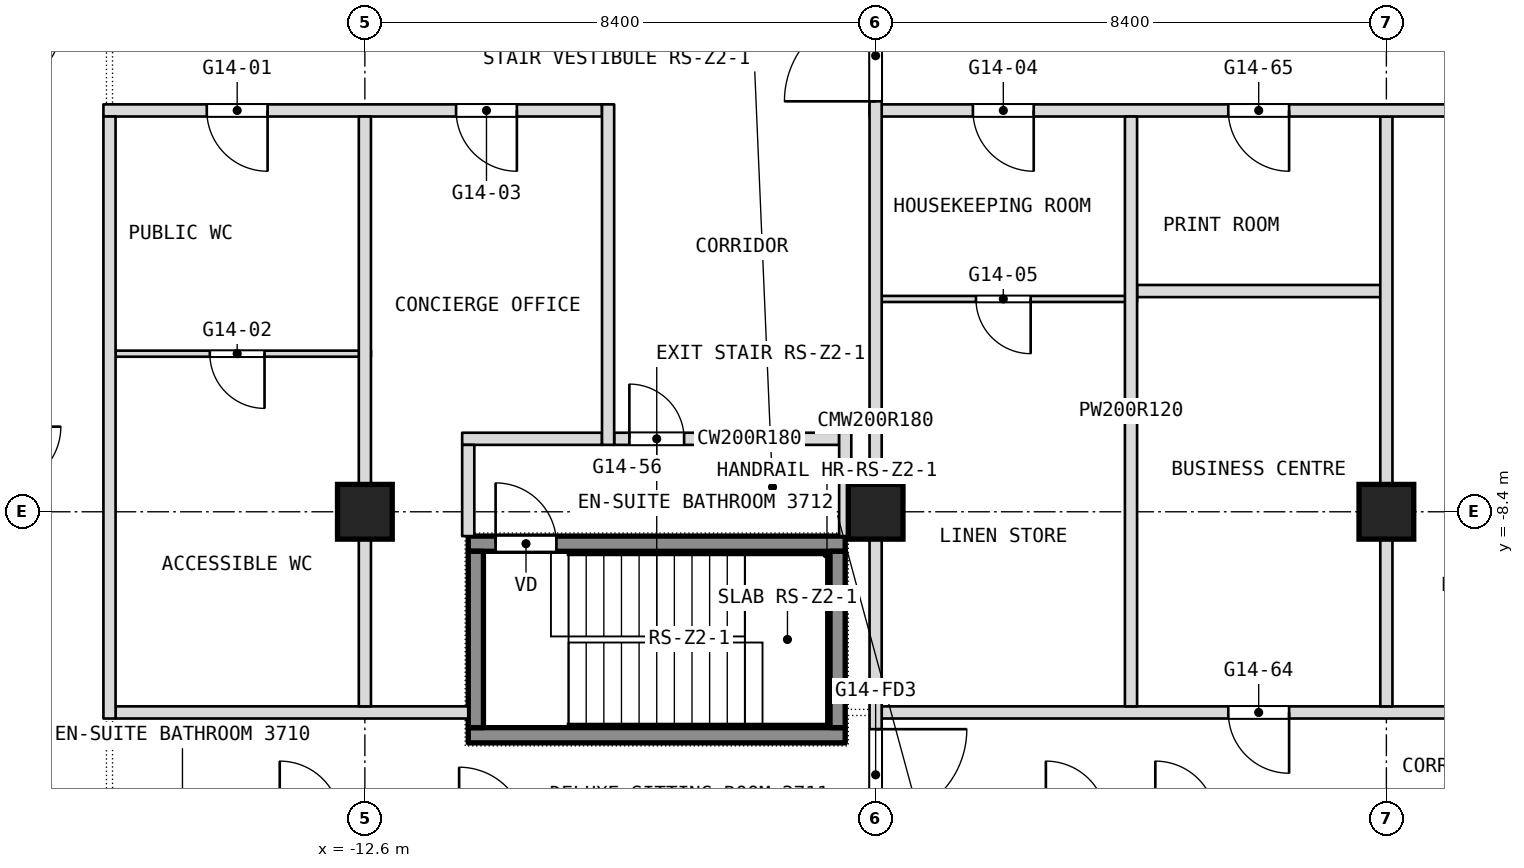
"""IFC4 building model, lengths in metres.
Left out: names, types, materials, properties, quantities, classifications, styles, units other than length and angle.
Written with IfcOpenShell. Run it as: python <this file> out.ifc"""

import sys

from ifc_helpers import new_model, si_unit, direction, frame, frame_2d, origin, origin_2d, place, context, subcontext, project, spatial, rectangle, extrude, element, fill, save


model = new_model("IFC4")
c1 = context("Model", 3, precision=1e-05, world=origin(), true_north=direction((0.0, 1.0)))
c2 = subcontext(c1, "Body", "Model", "MODEL_VIEW")
j1 = project(units=[si_unit("LENGTHUNIT", "METRE"), si_unit("PLANEANGLEUNIT", "RADIAN")], contexts=[c1])
p1 = place(None, origin())
s1 = spatial("IfcSite", under=j1, at=p1, CompositionType="ELEMENT")
p2 = place(p1, origin())
s2 = spatial("IfcBuilding", under=s1, at=p2, CompositionType="ELEMENT")
p3 = place(p2, frame((0.0, 0.0, 158.9)))
s3 = spatial("IfcBuildingStorey", under=s2, at=p3, CompositionType="ELEMENT", Elevation=158.9)
for number, where, z_axis, x_axis in (
    (1, (-12.6, -8.4, 0.0), (0.0, 0.0, 1.0), (1.0, 0.0, 0.0)),
    (2, (-4.2, -8.4, 0.0), (0.0, 0.0, 1.0), (1.0, 0.0, 0.0)),
    (3, (4.2, -8.4, 0.0), (0.0, 0.0, 1.0), (1.0, 0.0, 0.0)),
):
    element("IfcColumn", number, at=place(p3, frame(where, z_axis=z_axis, x_axis=x_axis)), inside=s3, PredefinedType="COLUMN", context=c2, shape_type="SweptSolid", body=[
        extrude(rectangle(XDim=0.9, YDim=0.9, at=origin_2d()), origin(), (0.0, 0.0, 1.0), 3.6),
    ])
p4 = place(p3, frame((-16.7, -11.7, 0.0), z_axis=(0.0, 0.0, 1.0), x_axis=(1.0, 0.0, 0.0)))
e4 = element("IfcWall", 4, at=p4, inside=s3, PredefinedType="PARTITIONING", context=c2, shape_type="SweptSolid", body=[
    extrude(rectangle(XDim=5.8, YDim=0.2, at=frame_2d((2.9, 0.0))), origin(), (0.0, 0.0, 1.0), 3.34),
])
p5 = place(p3, frame((-4.1, -11.7, 0.0), z_axis=(0.0, 0.0, 1.0), x_axis=(1.0, 0.0, 0.0)))
e5 = element("IfcWall", 5, at=p5, inside=s3, PredefinedType="PARTITIONING", context=c2, shape_type="SweptSolid", body=[
    extrude(rectangle(XDim=20.8, YDim=0.2, at=frame_2d((10.4, 0.0))), origin(), (0.0, 0.0, 1.0), 3.34),
])
p6 = place(p5, frame((14.1, 0.0, 0.0)))
e6 = element("IfcOpeningElement", 6, at=p6, cuts=e5, PredefinedType="OPENING", context=c2, shape_type="SweptSolid", body=[
    extrude(rectangle(XDim=1.0, YDim=2.1, at=frame_2d((0.5, 1.05))), frame((0.0, 0.1, 0.0), z_axis=(0.0, -1.0, 0.0), x_axis=(1.0, 0.0, 0.0)), (0.0, 0.0, 1.0), 0.2),
])
p7 = place(p5, frame((5.7, 0.0, 0.0)))
e7 = element("IfcOpeningElement", 7, at=p7, cuts=e5, PredefinedType="OPENING", context=c2, shape_type="SweptSolid", body=[
    extrude(rectangle(XDim=1.0, YDim=2.1, at=frame_2d((0.5, 1.05))), frame((0.0, 0.1, 0.0), z_axis=(0.0, -1.0, 0.0), x_axis=(1.0, 0.0, 0.0)), (0.0, 0.0, 1.0), 0.2),
])
p8 = place(p3, frame((-11.0, -7.2, 0.0), z_axis=(0.0, 0.0, 1.0), x_axis=(1.0, 0.0, 0.0)))
e8 = element("IfcWall", 8, at=p8, inside=s3, PredefinedType="PARTITIONING", context=c2, shape_type="SweptSolid", body=[
    extrude(rectangle(XDim=2.3, YDim=0.2, at=frame_2d((1.15, 0.0))), origin(), (0.0, 0.0, 1.0), 3.34),
])
p9 = place(p3, frame((-8.5, -7.2, 0.0), z_axis=(0.0, 0.0, 1.0), x_axis=(1.0, 0.0, 0.0)))
e9 = element("IfcWall", 9, at=p9, inside=s3, PredefinedType="PARTITIONING", context=c2, shape_type="SweptSolid", body=[
    extrude(rectangle(XDim=3.7, YDim=0.2, at=frame_2d((1.85, 0.0))), origin(), (0.0, 0.0, 1.0), 3.34),
])
p10 = place(p9, frame((0.25, 0.0, 0.0)))
e10 = element("IfcOpeningElement", 10, at=p10, cuts=e9, PredefinedType="OPENING", context=c2, shape_type="SweptSolid", body=[
    extrude(rectangle(XDim=0.9, YDim=2.1, at=frame_2d((0.45, 1.05))), frame((0.0, 0.1, 0.0), z_axis=(0.0, -1.0, 0.0), x_axis=(1.0, 0.0, 0.0)), (0.0, 0.0, 1.0), 0.2),
])
p11 = place(p3, frame((-16.7, -5.8, 0.0), z_axis=(0.0, 0.0, 1.0), x_axis=(1.0, 0.0, 0.0)))
e11 = element("IfcWall", 11, at=p11, inside=s3, PredefinedType="PARTITIONING", context=c2, shape_type="SweptSolid", body=[
    extrude(rectangle(XDim=4.2, YDim=0.1, at=frame_2d((2.1, 0.0))), origin(), (0.0, 0.0, 1.0), 3.34),
])
p12 = place(p11, frame((1.55, 0.0, 0.0)))
e12 = element("IfcOpeningElement", 12, at=p12, cuts=e11, PredefinedType="OPENING", context=c2, shape_type="SweptSolid", body=[
    extrude(rectangle(XDim=0.9, YDim=2.1, at=frame_2d((0.45, 1.05))), frame((0.0, 0.05, 0.0), z_axis=(0.0, -1.0, 0.0), x_axis=(1.0, 0.0, 0.0)), (0.0, 0.0, 1.0), 0.1),
])
p13 = place(p3, frame((-4.1, -4.9, 0.0), z_axis=(0.0, 0.0, 1.0), x_axis=(1.0, 0.0, 0.0)))
e13 = element("IfcWall", 13, at=p13, inside=s3, PredefinedType="PARTITIONING", context=c2, shape_type="SweptSolid", body=[
    extrude(rectangle(XDim=4.2, YDim=0.1, at=frame_2d((2.1, 0.0))), origin(), (0.0, 0.0, 1.0), 3.34),
])
p14 = place(p13, frame((1.55, 0.0, 0.0)))
e14 = element("IfcOpeningElement", 14, at=p14, cuts=e13, PredefinedType="OPENING", context=c2, shape_type="SweptSolid", body=[
    extrude(rectangle(XDim=0.9, YDim=2.1, at=frame_2d((0.45, 1.05))), frame((0.0, 0.05, 0.0), z_axis=(0.0, -1.0, 0.0), x_axis=(1.0, 0.0, 0.0)), (0.0, 0.0, 1.0), 0.1),
])
p15 = place(p3, frame((0.1, -4.77, 0.0), z_axis=(0.0, 0.0, 1.0), x_axis=(1.0, 0.0, 0.0)))
e15 = element("IfcWall", 15, at=p15, inside=s3, PredefinedType="PARTITIONING", context=c2, shape_type="SweptSolid", body=[
    extrude(rectangle(XDim=4.0, YDim=0.2, at=frame_2d((2.0, 0.0))), origin(), (0.0, 0.0, 1.0), 3.34),
])
p16 = place(p3, frame((4.2, -11.6, 0.0), z_axis=(0.0, 0.0, 1.0), x_axis=(0.0, 1.0, 0.0)))
e16 = element("IfcWall", 16, at=p16, inside=s3, PredefinedType="PARTITIONING", context=c2, shape_type="SweptSolid", body=[
    extrude(rectangle(XDim=9.7, YDim=0.2, at=frame_2d((4.85, 0.0))), origin(), (0.0, 0.0, 1.0), 3.34),
])
p17 = place(p3, frame((-16.9, -1.8, 0.0), z_axis=(0.0, 0.0, 1.0), x_axis=(1.0, 0.0, 0.0)))
e17 = element("IfcWall", 17, at=p17, inside=s3, PredefinedType="PARTITIONING", context=c2, shape_type="SweptSolid", body=[
    extrude(rectangle(XDim=8.2, YDim=0.2, at=frame_2d((4.1, 0.0))), origin(), (0.0, 0.0, 1.0), 3.34),
])
p18 = place(p17, frame((1.7, 0.0, 0.0)))
e18 = element("IfcOpeningElement", 18, at=p18, cuts=e17, PredefinedType="OPENING", context=c2, shape_type="SweptSolid", body=[
    extrude(rectangle(XDim=1.0, YDim=2.1, at=frame_2d((0.5, 1.05))), frame((0.0, 0.1, 0.0), z_axis=(0.0, -1.0, 0.0), x_axis=(1.0, 0.0, 0.0)), (0.0, 0.0, 1.0), 0.2),
])
p19 = place(p17, frame((5.8, 0.0, 0.0)))
e19 = element("IfcOpeningElement", 19, at=p19, cuts=e17, PredefinedType="OPENING", context=c2, shape_type="SweptSolid", body=[
    extrude(rectangle(XDim=1.0, YDim=2.1, at=frame_2d((0.5, 1.05))), frame((0.0, 0.1, 0.0), z_axis=(0.0, -1.0, 0.0), x_axis=(1.0, 0.0, 0.0)), (0.0, 0.0, 1.0), 0.2),
])
p20 = place(p3, frame((-4.3, -1.8, 0.0), z_axis=(0.0, 0.0, 1.0), x_axis=(1.0, 0.0, 0.0)))
e20 = element("IfcWall", 20, at=p20, inside=s3, PredefinedType="PARTITIONING", context=c2, shape_type="SweptSolid", body=[
    extrude(rectangle(XDim=11.3, YDim=0.2, at=frame_2d((5.65, 0.0))), origin(), (0.0, 0.0, 1.0), 3.34),
])
p21 = place(p20, frame((1.7, 0.0, 0.0)))
e21 = element("IfcOpeningElement", 21, at=p21, cuts=e20, PredefinedType="OPENING", context=c2, shape_type="SweptSolid", body=[
    extrude(rectangle(XDim=1.0, YDim=2.1, at=frame_2d((0.5, 1.05))), frame((0.0, 0.1, 0.0), z_axis=(0.0, -1.0, 0.0), x_axis=(1.0, 0.0, 0.0)), (0.0, 0.0, 1.0), 0.2),
])
p22 = place(p20, frame((10.1, 0.0, 0.0)))
e22 = element("IfcOpeningElement", 22, at=p22, cuts=e20, PredefinedType="OPENING", context=c2, shape_type="SweptSolid", body=[
    extrude(rectangle(XDim=1.0, YDim=2.1, at=frame_2d((0.5, 1.05))), frame((0.0, 0.1, 0.0), z_axis=(0.0, -1.0, 0.0), x_axis=(1.0, 0.0, 0.0)), (0.0, 0.0, 1.0), 0.2),
])
p23 = place(p20, frame((5.9, 0.0, 0.0)))
e23 = element("IfcOpeningElement", 23, at=p23, cuts=e20, PredefinedType="OPENING", context=c2, shape_type="SweptSolid", body=[
    extrude(rectangle(XDim=1.0, YDim=2.1, at=frame_2d((0.5, 1.05))), frame((0.0, 0.1, 0.0), z_axis=(0.0, -1.0, 0.0), x_axis=(1.0, 0.0, 0.0)), (0.0, 0.0, 1.0), 0.2),
])
p24 = place(p3, frame((0.0, -11.6, 0.0), z_axis=(0.0, 0.0, 1.0), x_axis=(0.0, 1.0, 0.0)))
e24 = element("IfcWall", 24, at=p24, inside=s3, PredefinedType="PARTITIONING", context=c2, shape_type="SweptSolid", body=[
    extrude(rectangle(XDim=9.7, YDim=0.2, at=frame_2d((4.85, 0.0))), origin(), (0.0, 0.0, 1.0), 3.34),
])
p25 = place(p3, frame((-4.2, -13.8, 0.0), z_axis=(0.0, 0.0, 1.0), x_axis=(0.0, 1.0, 0.0)))
e25 = element("IfcWall", 25, at=p25, inside=s3, PredefinedType="PARTITIONING", context=c2, shape_type="SweptSolid", body=[
    extrude(rectangle(XDim=13.8, YDim=0.2, at=frame_2d((6.9, 0.0))), origin(), (0.0, 0.0, 1.0), 3.34),
])
p26 = place(p25, frame((12.15, 0.0, 0.0)))
e26 = element("IfcOpeningElement", 26, at=p26, cuts=e25, PredefinedType="OPENING", context=c2, shape_type="SweptSolid", body=[
    extrude(rectangle(XDim=1.5, YDim=2.1, at=frame_2d((0.75, 1.05))), frame((0.0, 0.1, 0.0), z_axis=(0.0, -1.0, 0.0), x_axis=(1.0, 0.0, 0.0)), (0.0, 0.0, 1.0), 0.2),
])
p27 = place(p25, frame((0.325, 0.0, 0.0)))
e27 = element("IfcOpeningElement", 27, at=p27, cuts=e25, PredefinedType="OPENING", context=c2, shape_type="SweptSolid", body=[
    extrude(rectangle(XDim=1.5, YDim=2.1, at=frame_2d((0.75, 1.05))), frame((0.0, 0.1, 0.0), z_axis=(0.0, -1.0, 0.0), x_axis=(1.0, 0.0, 0.0)), (0.0, 0.0, 1.0), 0.2),
])
p28 = place(p3, frame((-4.7, -8.8, 0.0), z_axis=(0.0, 0.0, 1.0), x_axis=(0.0, 1.0, 0.0)))
e28 = element("IfcWall", 28, at=p28, inside=s3, PredefinedType="PARTITIONING", context=c2, shape_type="SweptSolid", body=[
    extrude(rectangle(XDim=1.7, YDim=0.2, at=frame_2d((0.85, 0.0))), origin(), (0.0, 0.0, 1.0), 3.34),
])
p29 = place(p3, frame((-8.6, -7.3, 0.0), z_axis=(0.0, 0.0, 1.0), x_axis=(0.0, 1.0, 0.0)))
e29 = element("IfcWall", 29, at=p29, inside=s3, PredefinedType="PARTITIONING", context=c2, shape_type="SweptSolid", body=[
    extrude(rectangle(XDim=5.6, YDim=0.2, at=frame_2d((2.8, 0.0))), origin(), (0.0, 0.0, 1.0), 3.34),
])
p30 = place(p3, frame((-10.9, -8.8, 0.0), z_axis=(0.0, 0.0, 1.0), x_axis=(0.0, 1.0, 0.0)))
e30 = element("IfcWall", 30, at=p30, inside=s3, PredefinedType="PARTITIONING", context=c2, shape_type="SweptSolid", body=[
    extrude(rectangle(XDim=1.5, YDim=0.2, at=frame_2d((0.75, 0.0))), origin(), (0.0, 0.0, 1.0), 3.34),
])
p31 = place(p3, frame((-12.6, -11.6, 0.0), z_axis=(0.0, 0.0, 1.0), x_axis=(0.0, 1.0, 0.0)))
e31 = element("IfcWall", 31, at=p31, inside=s3, PredefinedType="PARTITIONING", context=c2, shape_type="SweptSolid", body=[
    extrude(rectangle(XDim=9.7, YDim=0.2, at=frame_2d((4.85, 0.0))), origin(), (0.0, 0.0, 1.0), 3.34),
])
p32 = place(p3, frame((-16.8, -11.8, 0.0), z_axis=(0.0, 0.0, 1.0), x_axis=(0.0, 1.0, 0.0)))
e32 = element("IfcWall", 32, at=p32, inside=s3, PredefinedType="PARTITIONING", context=c2, shape_type="SweptSolid", body=[
    extrude(rectangle(XDim=9.9, YDim=0.2, at=frame_2d((4.95, 0.0))), origin(), (0.0, 0.0, 1.0), 3.34),
])
p33 = place(p3, frame((-10.9, -12.075, 0.1), z_axis=(0.0, 0.0, 1.0), x_axis=(1.0, 0.0, 0.0)))
e33 = element("IfcWall", 33, at=p33, inside=s3, PredefinedType="SHEAR", context=c2, shape_type="SweptSolid", body=[
    extrude(rectangle(XDim=6.2, YDim=0.25, at=frame_2d((3.1, 0.0))), origin(), (0.0, 0.0, 1.0), 3.6),
])
p34 = place(p3, frame((-10.9, -8.925, 0.1), z_axis=(0.0, 0.0, 1.0), x_axis=(1.0, 0.0, 0.0)))
e34 = element("IfcWall", 34, at=p34, inside=s3, PredefinedType="SHEAR", context=c2, shape_type="SweptSolid", body=[
    extrude(rectangle(XDim=6.2, YDim=0.25, at=frame_2d((3.1, 0.0))), origin(), (0.0, 0.0, 1.0), 3.6),
])
p35 = place(p34, frame((0.45, 0.0, 0.0)))
e35 = element("IfcOpeningElement", 35, at=p35, cuts=e34, PredefinedType="OPENING", context=c2, shape_type="SweptSolid", body=[
    extrude(rectangle(XDim=1.0, YDim=2.1, at=frame_2d((0.5, 1.05))), frame((0.0, 0.125, 0.0), z_axis=(0.0, -1.0, 0.0), x_axis=(1.0, 0.0, 0.0)), (0.0, 0.0, 1.0), 0.25),
])
for number, where, z_axis, x_axis in (
    (36, (-10.775, -11.95, 0.1), (0.0, 0.0, 1.0), (0.0, 1.0, 0.0)),
    (37, (-4.825, -11.95, 0.1), (0.0, 0.0, 1.0), (0.0, 1.0, 0.0)),
):
    element("IfcWall", number, at=place(p3, frame(where, z_axis=z_axis, x_axis=x_axis)), inside=s3, PredefinedType="SHEAR", context=c2, shape_type="SweptSolid", body=[
        extrude(rectangle(XDim=2.9, YDim=0.25, at=frame_2d((1.45, 0.0))), origin(), (0.0, 0.0, 1.0), 3.6),
    ])
p36 = place(p7, origin())
e38 = element("IfcDoor", 38, at=p36, inside=s3, OperationType="SINGLE_SWING_RIGHT", PredefinedType="DOOR", context=c2, shape_type="SweptSolid", body=[
    extrude(rectangle(XDim=1.0, YDim=2.1, at=frame_2d((0.5, 1.05))), frame((0.0, 0.025, 0.0), z_axis=(0.0, -1.0, 0.0), x_axis=(1.0, 0.0, 0.0)), (0.0, 0.0, 1.0), 0.05),
])
fill(e7, e38)
p37 = place(p10, origin())
e39 = element("IfcDoor", 39, at=p37, inside=s3, OperationType="SINGLE_SWING_RIGHT", PredefinedType="DOOR", context=c2, shape_type="SweptSolid", body=[
    extrude(rectangle(XDim=0.9, YDim=2.1, at=frame_2d((0.45, 1.05))), frame((0.0, 0.025, 0.0), z_axis=(0.0, -1.0, 0.0), x_axis=(1.0, 0.0, 0.0)), (0.0, 0.0, 1.0), 0.05),
])
fill(e10, e39)
p38 = place(p12, origin())
e40 = element("IfcDoor", 40, at=p38, inside=s3, OperationType="SINGLE_SWING_RIGHT", PredefinedType="DOOR", context=c2, shape_type="SweptSolid", body=[
    extrude(rectangle(XDim=0.9, YDim=2.1, at=frame_2d((0.45, 1.05))), frame((0.0, 0.025, 0.0), z_axis=(0.0, -1.0, 0.0), x_axis=(1.0, 0.0, 0.0)), (0.0, 0.0, 1.0), 0.05),
])
fill(e12, e40)
p39 = place(p14, origin())
e41 = element("IfcDoor", 41, at=p39, inside=s3, OperationType="SINGLE_SWING_LEFT", PredefinedType="DOOR", context=c2, shape_type="SweptSolid", body=[
    extrude(rectangle(XDim=0.9, YDim=2.1, at=frame_2d((0.45, 1.05))), frame((0.0, 0.025, 0.0), z_axis=(0.0, -1.0, 0.0), x_axis=(1.0, 0.0, 0.0)), (0.0, 0.0, 1.0), 0.05),
])
fill(e14, e41)
p40 = place(p18, origin())
e42 = element("IfcDoor", 42, at=p40, inside=s3, OperationType="SINGLE_SWING_LEFT", PredefinedType="DOOR", context=c2, shape_type="SweptSolid", body=[
    extrude(rectangle(XDim=1.0, YDim=2.1, at=frame_2d((0.5, 1.05))), frame((0.0, 0.025, 0.0), z_axis=(0.0, -1.0, 0.0), x_axis=(1.0, 0.0, 0.0)), (0.0, 0.0, 1.0), 0.05),
])
fill(e18, e42)
p41 = place(p19, origin())
e43 = element("IfcDoor", 43, at=p41, inside=s3, OperationType="SINGLE_SWING_LEFT", PredefinedType="DOOR", context=c2, shape_type="SweptSolid", body=[
    extrude(rectangle(XDim=1.0, YDim=2.1, at=frame_2d((0.5, 1.05))), frame((0.0, 0.025, 0.0), z_axis=(0.0, -1.0, 0.0), x_axis=(1.0, 0.0, 0.0)), (0.0, 0.0, 1.0), 0.05),
])
fill(e19, e43)
p42 = place(p21, origin())
e44 = element("IfcDoor", 44, at=p42, inside=s3, OperationType="SINGLE_SWING_RIGHT", PredefinedType="DOOR", context=c2, shape_type="SweptSolid", body=[
    extrude(rectangle(XDim=1.0, YDim=2.1, at=frame_2d((0.5, 1.05))), frame((0.0, 0.025, 0.0), z_axis=(0.0, -1.0, 0.0), x_axis=(1.0, 0.0, 0.0)), (0.0, 0.0, 1.0), 0.05),
])
fill(e21, e44)
p43 = place(p23, origin())
e45 = element("IfcDoor", 45, at=p43, inside=s3, OperationType="SINGLE_SWING_LEFT", PredefinedType="DOOR", context=c2, shape_type="SweptSolid", body=[
    extrude(rectangle(XDim=1.0, YDim=2.1, at=frame_2d((0.5, 1.05))), frame((0.0, 0.025, 0.0), z_axis=(0.0, -1.0, 0.0), x_axis=(1.0, 0.0, 0.0)), (0.0, 0.0, 1.0), 0.05),
])
fill(e23, e45)
p44 = place(p35, origin())
e46 = element("IfcDoor", 46, at=p44, inside=s3, OperationType="SINGLE_SWING_LEFT", PredefinedType="DOOR", context=c2, shape_type="SweptSolid", body=[
    extrude(rectangle(XDim=1.0, YDim=2.1, at=frame_2d((0.5, 1.05))), frame((0.0, 0.025, 0.0), z_axis=(0.0, -1.0, 0.0), x_axis=(1.0, 0.0, 0.0)), (0.0, 0.0, 1.0), 0.05),
])
fill(e35, e46)
p45 = place(p26, origin())
e47 = element("IfcDoor", 47, at=p45, inside=s3, OperationType="DOUBLE_DOOR_DOUBLE_SWING", PredefinedType="DOOR", context=c2, shape_type="SweptSolid", body=[
    extrude(rectangle(XDim=1.5, YDim=2.1, at=frame_2d((0.75, 1.05))), frame((0.0, 0.025, 0.0), z_axis=(0.0, -1.0, 0.0), x_axis=(1.0, 0.0, 0.0)), (0.0, 0.0, 1.0), 0.05),
])
fill(e26, e47)
p46 = place(p27, origin())
e48 = element("IfcDoor", 48, at=p46, inside=s3, OperationType="DOUBLE_DOOR_DOUBLE_SWING", PredefinedType="DOOR", context=c2, shape_type="SweptSolid", body=[
    extrude(rectangle(XDim=1.5, YDim=2.1, at=frame_2d((0.75, 1.05))), frame((0.0, 0.025, 0.0), z_axis=(0.0, -1.0, 0.0), x_axis=(1.0, 0.0, 0.0)), (0.0, 0.0, 1.0), 0.05),
])
fill(e27, e48)
save(model, sys.argv[1])
